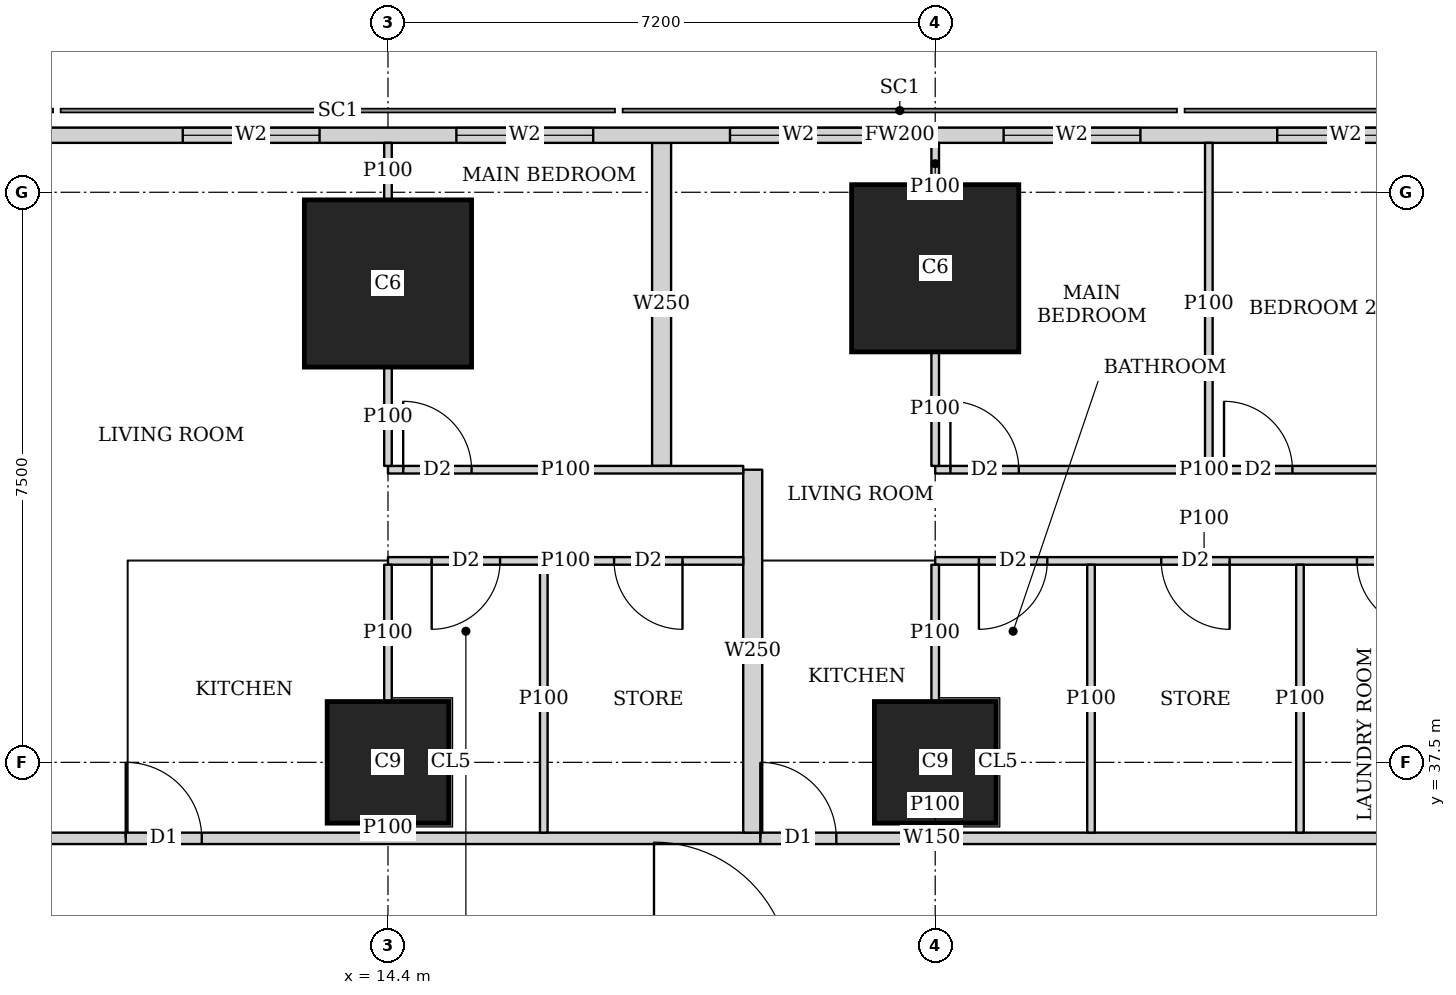
"""IFC4 building model, lengths in metres.
Left out: names, types, materials, properties, quantities, classifications, styles, units other than length and angle.
Written with IfcOpenShell. Run it as: python <this file> out.ifc"""

import sys

from ifc_helpers import new_model, si_unit, direction, frame, frame_2d, origin, origin_2d, place, context, subcontext, project, spatial, rectangle, extrude, element, fill, save


model = new_model("IFC4")
c1 = context("Model", 3, precision=1e-05, world=origin(), true_north=direction((0.0, 1.0)))
c2 = subcontext(c1, "Body", "Model", "MODEL_VIEW")
j1 = project(units=[si_unit("LENGTHUNIT", "METRE"), si_unit("PLANEANGLEUNIT", "RADIAN")], contexts=[c1])
p1 = place(None, origin())
s1 = spatial("IfcSite", under=j1, at=p1, CompositionType="ELEMENT")
p2 = place(p1, origin())
s2 = spatial("IfcBuilding", under=s1, at=p2, CompositionType="ELEMENT")
p3 = place(p2, frame((0.0, 0.0, 111.65)))
s3 = spatial("IfcBuildingStorey", under=s2, at=p3, CompositionType="ELEMENT", Elevation=111.65)
for number, where, z_axis, x_axis in (
    (1, (14.4, 37.5, 0.0), (0.0, 0.0, 1.0), (1.0, 0.0, 0.0)),
    (2, (21.6, 37.5, 0.0), (0.0, 0.0, 1.0), (1.0, 0.0, 0.0)),
):
    element("IfcColumn", number, at=place(p3, frame(where, z_axis=z_axis, x_axis=x_axis)), inside=s3, PredefinedType="COLUMN", context=c2, shape_type="SweptSolid", body=[
        extrude(rectangle(XDim=1.6, YDim=1.6, at=origin_2d()), origin(), (0.0, 0.0, 1.0), 3.75),
    ])
for number, where, z_axis, x_axis in (
    (3, (14.4, 43.8, 0.0), (0.0, 0.0, 1.0), (1.0, 0.0, 0.0)),
    (4, (21.6, 44.0, 0.0), (0.0, 0.0, 1.0), (1.0, 0.0, 0.0)),
):
    element("IfcColumn", number, at=place(p3, frame(where, z_axis=z_axis, x_axis=x_axis)), inside=s3, PredefinedType="COLUMN", context=c2, shape_type="SweptSolid", body=[
        extrude(rectangle(XDim=2.2, YDim=2.2, at=origin_2d()), origin(), (0.0, 0.0, 1.0), 3.75),
    ])
p4 = place(p3, frame((40.106, 45.75, 0.0), z_axis=(0.0, 0.0, 1.0), x_axis=(-1.0, 0.0, 0.0)))
e5 = element("IfcWall", 5, at=p4, inside=s3, PredefinedType="SOLIDWALL", context=c2, shape_type="SweptSolid", body=[
    extrude(rectangle(XDim=37.943, YDim=0.2, at=frame_2d((18.971, 0.0))), origin(), (0.0, 0.0, 1.0), 3.5),
])
p5 = place(p4, frame((8.606, 0.0, 0.9)))
e6 = element("IfcOpeningElement", 6, at=p5, cuts=e5, PredefinedType="OPENING", context=c2, shape_type="SweptSolid", body=[
    extrude(rectangle(XDim=1.8, YDim=1.5, at=frame_2d((0.9, 0.75))), frame((0.0, 0.11, 0.0), z_axis=(0.0, -1.0, 0.0), x_axis=(1.0, 0.0, 0.0)), (0.0, 0.0, 1.0), 0.22),
])
p6 = place(p4, frame((12.206, 0.0, 0.9)))
e7 = element("IfcOpeningElement", 7, at=p6, cuts=e5, PredefinedType="OPENING", context=c2, shape_type="SweptSolid", body=[
    extrude(rectangle(XDim=1.8, YDim=1.5, at=frame_2d((0.9, 0.75))), frame((0.0, 0.11, 0.0), z_axis=(0.0, -1.0, 0.0), x_axis=(1.0, 0.0, 0.0)), (0.0, 0.0, 1.0), 0.22),
])
p7 = place(p4, frame((15.806, 0.0, 0.9)))
e8 = element("IfcOpeningElement", 8, at=p7, cuts=e5, PredefinedType="OPENING", context=c2, shape_type="SweptSolid", body=[
    extrude(rectangle(XDim=1.8, YDim=1.5, at=frame_2d((0.9, 0.75))), frame((0.0, 0.11, 0.0), z_axis=(0.0, -1.0, 0.0), x_axis=(1.0, 0.0, 0.0)), (0.0, 0.0, 1.0), 0.22),
])
p8 = place(p4, frame((19.406, 0.0, 0.9)))
e9 = element("IfcOpeningElement", 9, at=p8, cuts=e5, PredefinedType="OPENING", context=c2, shape_type="SweptSolid", body=[
    extrude(rectangle(XDim=1.8, YDim=1.5, at=frame_2d((0.9, 0.75))), frame((0.0, 0.11, 0.0), z_axis=(0.0, -1.0, 0.0), x_axis=(1.0, 0.0, 0.0)), (0.0, 0.0, 1.0), 0.22),
])
p9 = place(p4, frame((23.006, 0.0, 0.9)))
e10 = element("IfcOpeningElement", 10, at=p9, cuts=e5, PredefinedType="OPENING", context=c2, shape_type="SweptSolid", body=[
    extrude(rectangle(XDim=1.8, YDim=1.5, at=frame_2d((0.9, 0.75))), frame((0.0, 0.11, 0.0), z_axis=(0.0, -1.0, 0.0), x_axis=(1.0, 0.0, 0.0)), (0.0, 0.0, 1.0), 0.22),
])
p10 = place(p4, frame((26.606, 0.0, 0.9)))
e11 = element("IfcOpeningElement", 11, at=p10, cuts=e5, PredefinedType="OPENING", context=c2, shape_type="SweptSolid", body=[
    extrude(rectangle(XDim=1.8, YDim=1.5, at=frame_2d((0.9, 0.75))), frame((0.0, 0.11, 0.0), z_axis=(0.0, -1.0, 0.0), x_axis=(1.0, 0.0, 0.0)), (0.0, 0.0, 1.0), 0.22),
])
p11 = place(p3, frame((8.35, 36.5, 0.0), z_axis=(0.0, 0.0, 1.0), x_axis=(1.0, 0.0, 0.0)))
e12 = element("IfcWall", 12, at=p11, inside=s3, PredefinedType="SOLIDWALL", context=c2, shape_type="SweptSolid", body=[
    extrude(rectangle(XDim=26.415, YDim=0.15, at=frame_2d((13.208, 0.0))), origin(), (0.0, 0.0, 1.0), 3.5),
])
p12 = place(p11, frame((2.6, 0.0, 0.0)))
e13 = element("IfcOpeningElement", 13, at=p12, cuts=e12, PredefinedType="OPENING", context=c2, shape_type="SweptSolid", body=[
    extrude(rectangle(XDim=1.0, YDim=2.1, at=frame_2d((0.5, 1.05))), frame((0.0, 0.085, 0.0), z_axis=(0.0, -1.0, 0.0), x_axis=(1.0, 0.0, 0.0)), (0.0, 0.0, 1.0), 0.17),
])
p13 = place(p11, frame((10.949, 0.0, 0.0)))
e14 = element("IfcOpeningElement", 14, at=p13, cuts=e12, PredefinedType="OPENING", context=c2, shape_type="SweptSolid", body=[
    extrude(rectangle(XDim=1.0, YDim=2.1, at=frame_2d((0.5, 1.05))), frame((0.0, 0.085, 0.0), z_axis=(0.0, -1.0, 0.0), x_axis=(1.0, 0.0, 0.0)), (0.0, 0.0, 1.0), 0.17),
])
p14 = place(p11, frame((23.923, 0.0, 0.0)))
e15 = element("IfcOpeningElement", 15, at=p14, cuts=e12, PredefinedType="OPENING", context=c2, shape_type="SweptSolid", body=[
    extrude(rectangle(XDim=1.0, YDim=2.1, at=frame_2d((0.5, 1.05))), frame((0.0, 0.085, 0.0), z_axis=(0.0, -1.0, 0.0), x_axis=(1.0, 0.0, 0.0)), (0.0, 0.0, 1.0), 0.17),
])
p15 = place(p3, frame((14.4, 41.35, 0.0), z_axis=(0.0, 0.0, 1.0), x_axis=(1.0, 0.0, 0.0)))
e16 = element("IfcWall", 16, at=p15, inside=s3, PredefinedType="PARTITIONING", context=c2, shape_type="SweptSolid", body=[
    extrude(rectangle(XDim=4.674, YDim=0.1, at=frame_2d((2.337, 0.0))), origin(), (0.0, 0.0, 1.0), 3.5),
])
p16 = place(p15, frame((0.2, 0.0, 0.0)))
e17 = element("IfcOpeningElement", 17, at=p16, cuts=e16, PredefinedType="OPENING", context=c2, shape_type="SweptSolid", body=[
    extrude(rectangle(XDim=0.9, YDim=2.1, at=frame_2d((0.45, 1.05))), frame((0.0, 0.06, 0.0), z_axis=(0.0, -1.0, 0.0), x_axis=(1.0, 0.0, 0.0)), (0.0, 0.0, 1.0), 0.12),
])
p17 = place(p3, frame((14.4, 40.15, 0.0), z_axis=(0.0, 0.0, 1.0), x_axis=(1.0, 0.0, 0.0)))
e18 = element("IfcWall", 18, at=p17, inside=s3, PredefinedType="PARTITIONING", context=c2, shape_type="SweptSolid", body=[
    extrude(rectangle(XDim=4.674, YDim=0.1, at=frame_2d((2.337, 0.0))), origin(), (0.0, 0.0, 1.0), 3.5),
])
p18 = place(p17, frame((0.575, 0.0, 0.0)))
e19 = element("IfcOpeningElement", 19, at=p18, cuts=e18, PredefinedType="OPENING", context=c2, shape_type="SweptSolid", body=[
    extrude(rectangle(XDim=0.9, YDim=2.1, at=frame_2d((0.45, 1.05))), frame((0.0, 0.06, 0.0), z_axis=(0.0, -1.0, 0.0), x_axis=(1.0, 0.0, 0.0)), (0.0, 0.0, 1.0), 0.12),
])
p19 = place(p17, frame((2.975, 0.0, 0.0)))
e20 = element("IfcOpeningElement", 20, at=p19, cuts=e18, PredefinedType="OPENING", context=c2, shape_type="SweptSolid", body=[
    extrude(rectangle(XDim=0.9, YDim=2.1, at=frame_2d((0.45, 1.05))), frame((0.0, 0.06, 0.0), z_axis=(0.0, -1.0, 0.0), x_axis=(1.0, 0.0, 0.0)), (0.0, 0.0, 1.0), 0.12),
])
p20 = place(p3, frame((14.4, 41.4, 0.0), z_axis=(0.0, 0.0, 1.0), x_axis=(0.0, 1.0, 0.0)))
e21 = element("IfcWall", 21, at=p20, inside=s3, PredefinedType="PARTITIONING", context=c2, shape_type="SweptSolid", body=[
    extrude(rectangle(XDim=1.299, YDim=0.1, at=frame_2d((0.649, 0.0))), origin(), (0.0, 0.0, 1.0), 3.5),
])
p21 = place(p3, frame((14.4, 44.901, 0.0), z_axis=(0.0, 0.0, 1.0), x_axis=(0.0, 1.0, 0.0)))
e22 = element("IfcWall", 22, at=p21, inside=s3, PredefinedType="PARTITIONING", context=c2, shape_type="SweptSolid", body=[
    extrude(rectangle(XDim=0.749, YDim=0.1, at=frame_2d((0.375, 0.0))), origin(), (0.0, 0.0, 1.0), 3.5),
])
p22 = place(p3, frame((14.4, 36.575, 0.0), z_axis=(0.0, 0.0, 1.0), x_axis=(0.0, 1.0, 0.0)))
e23 = element("IfcWall", 23, at=p22, inside=s3, PredefinedType="PARTITIONING", context=c2, shape_type="SweptSolid", body=[
    extrude(rectangle(XDim=0.124, YDim=0.1, at=frame_2d((0.062, 0.0))), origin(), (0.0, 0.0, 1.0), 3.5),
])
p23 = place(p3, frame((14.4, 38.301, 0.0), z_axis=(0.0, 0.0, 1.0), x_axis=(0.0, 1.0, 0.0)))
e24 = element("IfcWall", 24, at=p23, inside=s3, PredefinedType="PARTITIONING", context=c2, shape_type="SweptSolid", body=[
    extrude(rectangle(XDim=1.799, YDim=0.1, at=frame_2d((0.899, 0.0))), origin(), (0.0, 0.0, 1.0), 3.5),
])
p24 = place(p3, frame((16.45, 36.575, 0.0), z_axis=(0.0, 0.0, 1.0), x_axis=(0.0, 1.0, 0.0)))
e25 = element("IfcWall", 25, at=p24, inside=s3, PredefinedType="PARTITIONING", context=c2, shape_type="SweptSolid", body=[
    extrude(rectangle(XDim=3.525, YDim=0.1, at=frame_2d((1.763, 0.0))), origin(), (0.0, 0.0, 1.0), 3.5),
])
p25 = place(p3, frame((21.6, 41.35, 0.0), z_axis=(0.0, 0.0, 1.0), x_axis=(1.0, 0.0, 0.0)))
e26 = element("IfcWall", 26, at=p25, inside=s3, PredefinedType="PARTITIONING", context=c2, shape_type="SweptSolid", body=[
    extrude(rectangle(XDim=7.075, YDim=0.1, at=frame_2d((3.538, 0.0))), origin(), (0.0, 0.0, 1.0), 3.5),
])
p26 = place(p25, frame((0.2, 0.0, 0.0)))
e27 = element("IfcOpeningElement", 27, at=p26, cuts=e26, PredefinedType="OPENING", context=c2, shape_type="SweptSolid", body=[
    extrude(rectangle(XDim=0.9, YDim=2.1, at=frame_2d((0.45, 1.05))), frame((0.0, 0.06, 0.0), z_axis=(0.0, -1.0, 0.0), x_axis=(1.0, 0.0, 0.0)), (0.0, 0.0, 1.0), 0.12),
])
p27 = place(p25, frame((3.8, 0.0, 0.0)))
e28 = element("IfcOpeningElement", 28, at=p27, cuts=e26, PredefinedType="OPENING", context=c2, shape_type="SweptSolid", body=[
    extrude(rectangle(XDim=0.9, YDim=2.1, at=frame_2d((0.45, 1.05))), frame((0.0, 0.06, 0.0), z_axis=(0.0, -1.0, 0.0), x_axis=(1.0, 0.0, 0.0)), (0.0, 0.0, 1.0), 0.12),
])
p28 = place(p3, frame((21.6, 40.15, 0.0), z_axis=(0.0, 0.0, 1.0), x_axis=(1.0, 0.0, 0.0)))
e29 = element("IfcWall", 29, at=p28, inside=s3, PredefinedType="PARTITIONING", context=c2, shape_type="SweptSolid", body=[
    extrude(rectangle(XDim=7.075, YDim=0.1, at=frame_2d((3.538, 0.0))), origin(), (0.0, 0.0, 1.0), 3.5),
])
p29 = place(p28, frame((0.575, 0.0, 0.0)))
e30 = element("IfcOpeningElement", 30, at=p29, cuts=e29, PredefinedType="OPENING", context=c2, shape_type="SweptSolid", body=[
    extrude(rectangle(XDim=0.9, YDim=2.1, at=frame_2d((0.45, 1.05))), frame((0.0, 0.06, 0.0), z_axis=(0.0, -1.0, 0.0), x_axis=(1.0, 0.0, 0.0)), (0.0, 0.0, 1.0), 0.12),
])
p30 = place(p28, frame((5.549, 0.0, 0.0)))
e31 = element("IfcOpeningElement", 31, at=p30, cuts=e29, PredefinedType="OPENING", context=c2, shape_type="SweptSolid", body=[
    extrude(rectangle(XDim=0.9, YDim=2.1, at=frame_2d((0.45, 1.05))), frame((0.0, 0.06, 0.0), z_axis=(0.0, -1.0, 0.0), x_axis=(1.0, 0.0, 0.0)), (0.0, 0.0, 1.0), 0.12),
])
p31 = place(p28, frame((2.974, 0.0, 0.0)))
e32 = element("IfcOpeningElement", 32, at=p31, cuts=e29, PredefinedType="OPENING", context=c2, shape_type="SweptSolid", body=[
    extrude(rectangle(XDim=0.9, YDim=2.1, at=frame_2d((0.45, 1.05))), frame((0.0, 0.06, 0.0), z_axis=(0.0, -1.0, 0.0), x_axis=(1.0, 0.0, 0.0)), (0.0, 0.0, 1.0), 0.12),
])
p32 = place(p3, frame((21.6, 41.4, 0.0), z_axis=(0.0, 0.0, 1.0), x_axis=(0.0, 1.0, 0.0)))
e33 = element("IfcWall", 33, at=p32, inside=s3, PredefinedType="PARTITIONING", context=c2, shape_type="SweptSolid", body=[
    extrude(rectangle(XDim=1.499, YDim=0.1, at=frame_2d((0.75, 0.0))), origin(), (0.0, 0.0, 1.0), 3.5),
])
p33 = place(p3, frame((21.6, 45.101, 0.0), z_axis=(0.0, 0.0, 1.0), x_axis=(0.0, 1.0, 0.0)))
e34 = element("IfcWall", 34, at=p33, inside=s3, PredefinedType="PARTITIONING", context=c2, shape_type="SweptSolid", body=[
    extrude(rectangle(XDim=0.549, YDim=0.1, at=frame_2d((0.274, 0.0))), origin(), (0.0, 0.0, 1.0), 3.5),
])
p34 = place(p3, frame((25.2, 41.4, 0.0), z_axis=(0.0, 0.0, 1.0), x_axis=(0.0, 1.0, 0.0)))
e35 = element("IfcWall", 35, at=p34, inside=s3, PredefinedType="PARTITIONING", context=c2, shape_type="SweptSolid", body=[
    extrude(rectangle(XDim=4.25, YDim=0.1, at=frame_2d((2.125, 0.0))), origin(), (0.0, 0.0, 1.0), 2.2),
])
p35 = place(p3, frame((21.6, 36.575, 0.0), z_axis=(0.0, 0.0, 1.0), x_axis=(0.0, 1.0, 0.0)))
e36 = element("IfcWall", 36, at=p35, inside=s3, PredefinedType="PARTITIONING", context=c2, shape_type="SweptSolid", body=[
    extrude(rectangle(XDim=0.124, YDim=0.1, at=frame_2d((0.062, 0.0))), origin(), (0.0, 0.0, 1.0), 3.5),
])
p36 = place(p3, frame((21.6, 38.301, 0.0), z_axis=(0.0, 0.0, 1.0), x_axis=(0.0, 1.0, 0.0)))
e37 = element("IfcWall", 37, at=p36, inside=s3, PredefinedType="PARTITIONING", context=c2, shape_type="SweptSolid", body=[
    extrude(rectangle(XDim=1.799, YDim=0.1, at=frame_2d((0.899, 0.0))), origin(), (0.0, 0.0, 1.0), 3.5),
])
for number, where, z_axis, x_axis in (
    (38, (26.399, 36.575, 0.0), (0.0, 0.0, 1.0), (0.0, 1.0, 0.0)),
    (39, (23.65, 36.575, 0.0), (0.0, 0.0, 1.0), (0.0, 1.0, 0.0)),
):
    element("IfcWall", number, at=place(p3, frame(where, z_axis=z_axis, x_axis=x_axis)), inside=s3, PredefinedType="PARTITIONING", context=c2, shape_type="SweptSolid", body=[
        extrude(rectangle(XDim=3.525, YDim=0.1, at=frame_2d((1.763, 0.0))), origin(), (0.0, 0.0, 1.0), 3.5),
    ])
p37 = place(p3, frame((18.0, 41.4, 0.0), z_axis=(0.0, 0.0, 1.0), x_axis=(0.0, 1.0, 0.0)))
e40 = element("IfcWall", 40, at=p37, inside=s3, PredefinedType="SOLIDWALL", context=c2, shape_type="SweptSolid", body=[
    extrude(rectangle(XDim=4.25, YDim=0.25, at=frame_2d((2.125, 0.0))), origin(), (0.0, 0.0, 1.0), 2.2),
])
p38 = place(p3, frame((19.199, 36.575, 0.0), z_axis=(0.0, 0.0, 1.0), x_axis=(0.0, 1.0, 0.0)))
e41 = element("IfcWall", 41, at=p38, inside=s3, PredefinedType="SOLIDWALL", context=c2, shape_type="SweptSolid", body=[
    extrude(rectangle(XDim=4.775, YDim=0.25, at=frame_2d((2.388, 0.0))), origin(), (0.0, 0.0, 1.0), 3.5),
])
p39 = place(p6, origin())
e42 = element("IfcWindow", 42, at=p39, inside=s3, PartitioningType="SINGLE_PANEL", PredefinedType="WINDOW", context=c2, shape_type="SweptSolid", body=[
    extrude(rectangle(XDim=1.8, YDim=1.5, at=frame_2d((0.9, 0.75))), frame((0.0, 0.03, 0.0), z_axis=(0.0, -1.0, 0.0), x_axis=(1.0, 0.0, 0.0)), (0.0, 0.0, 1.0), 0.06),
])
fill(e7, e42)
p40 = place(p7, origin())
e43 = element("IfcWindow", 43, at=p40, inside=s3, PartitioningType="SINGLE_PANEL", PredefinedType="WINDOW", context=c2, shape_type="SweptSolid", body=[
    extrude(rectangle(XDim=1.8, YDim=1.5, at=frame_2d((0.9, 0.75))), frame((0.0, 0.03, 0.0), z_axis=(0.0, -1.0, 0.0), x_axis=(1.0, 0.0, 0.0)), (0.0, 0.0, 1.0), 0.06),
])
fill(e8, e43)
p41 = place(p8, origin())
e44 = element("IfcWindow", 44, at=p41, inside=s3, PartitioningType="SINGLE_PANEL", PredefinedType="WINDOW", context=c2, shape_type="SweptSolid", body=[
    extrude(rectangle(XDim=1.8, YDim=1.5, at=frame_2d((0.9, 0.75))), frame((0.0, 0.03, 0.0), z_axis=(0.0, -1.0, 0.0), x_axis=(1.0, 0.0, 0.0)), (0.0, 0.0, 1.0), 0.06),
])
fill(e9, e44)
p42 = place(p9, origin())
e45 = element("IfcWindow", 45, at=p42, inside=s3, PartitioningType="SINGLE_PANEL", PredefinedType="WINDOW", context=c2, shape_type="SweptSolid", body=[
    extrude(rectangle(XDim=1.8, YDim=1.5, at=frame_2d((0.9, 0.75))), frame((0.0, 0.03, 0.0), z_axis=(0.0, -1.0, 0.0), x_axis=(1.0, 0.0, 0.0)), (0.0, 0.0, 1.0), 0.06),
])
fill(e10, e45)
p43 = place(p10, origin())
e46 = element("IfcWindow", 46, at=p43, inside=s3, PartitioningType="SINGLE_PANEL", PredefinedType="WINDOW", context=c2, shape_type="SweptSolid", body=[
    extrude(rectangle(XDim=1.8, YDim=1.5, at=frame_2d((0.9, 0.75))), frame((0.0, 0.03, 0.0), z_axis=(0.0, -1.0, 0.0), x_axis=(1.0, 0.0, 0.0)), (0.0, 0.0, 1.0), 0.06),
])
fill(e11, e46)
p44 = place(p16, origin())
e47 = element("IfcDoor", 47, at=p44, inside=s3, OperationType="SINGLE_SWING_LEFT", PredefinedType="DOOR", context=c2, shape_type="SweptSolid", body=[
    extrude(rectangle(XDim=0.9, YDim=2.1, at=frame_2d((0.45, 1.05))), frame((0.0, 0.025, 0.0), z_axis=(0.0, -1.0, 0.0), x_axis=(1.0, 0.0, 0.0)), (0.0, 0.0, 1.0), 0.05),
])
fill(e17, e47)
p45 = place(p18, origin())
e48 = element("IfcDoor", 48, at=p45, inside=s3, OperationType="SINGLE_SWING_RIGHT", PredefinedType="DOOR", context=c2, shape_type="SweptSolid", body=[
    extrude(rectangle(XDim=0.9, YDim=2.1, at=frame_2d((0.45, 1.05))), frame((0.0, 0.025, 0.0), z_axis=(0.0, -1.0, 0.0), x_axis=(1.0, 0.0, 0.0)), (0.0, 0.0, 1.0), 0.05),
])
fill(e19, e48)
p46 = place(p19, origin())
e49 = element("IfcDoor", 49, at=p46, inside=s3, OperationType="SINGLE_SWING_LEFT", PredefinedType="DOOR", context=c2, shape_type="SweptSolid", body=[
    extrude(rectangle(XDim=0.9, YDim=2.1, at=frame_2d((0.45, 1.05))), frame((0.0, 0.025, 0.0), z_axis=(0.0, -1.0, 0.0), x_axis=(1.0, 0.0, 0.0)), (0.0, 0.0, 1.0), 0.05),
])
fill(e20, e49)
p47 = place(p12, origin())
e50 = element("IfcDoor", 50, at=p47, inside=s3, OperationType="SINGLE_SWING_LEFT", PredefinedType="DOOR", context=c2, shape_type="SweptSolid", body=[
    extrude(rectangle(XDim=1.0, YDim=2.1, at=frame_2d((0.5, 1.05))), frame((0.0, 0.025, 0.0), z_axis=(0.0, -1.0, 0.0), x_axis=(1.0, 0.0, 0.0)), (0.0, 0.0, 1.0), 0.05),
])
fill(e13, e50)
p48 = place(p26, origin())
e51 = element("IfcDoor", 51, at=p48, inside=s3, OperationType="SINGLE_SWING_LEFT", PredefinedType="DOOR", context=c2, shape_type="SweptSolid", body=[
    extrude(rectangle(XDim=0.9, YDim=2.1, at=frame_2d((0.45, 1.05))), frame((0.0, 0.025, 0.0), z_axis=(0.0, -1.0, 0.0), x_axis=(1.0, 0.0, 0.0)), (0.0, 0.0, 1.0), 0.05),
])
fill(e27, e51)
p49 = place(p27, origin())
e52 = element("IfcDoor", 52, at=p49, inside=s3, OperationType="SINGLE_SWING_LEFT", PredefinedType="DOOR", context=c2, shape_type="SweptSolid", body=[
    extrude(rectangle(XDim=0.9, YDim=2.1, at=frame_2d((0.45, 1.05))), frame((0.0, 0.025, 0.0), z_axis=(0.0, -1.0, 0.0), x_axis=(1.0, 0.0, 0.0)), (0.0, 0.0, 1.0), 0.05),
])
fill(e28, e52)
p50 = place(p29, origin())
e53 = element("IfcDoor", 53, at=p50, inside=s3, OperationType="SINGLE_SWING_RIGHT", PredefinedType="DOOR", context=c2, shape_type="SweptSolid", body=[
    extrude(rectangle(XDim=0.9, YDim=2.1, at=frame_2d((0.45, 1.05))), frame((0.0, 0.025, 0.0), z_axis=(0.0, -1.0, 0.0), x_axis=(1.0, 0.0, 0.0)), (0.0, 0.0, 1.0), 0.05),
])
fill(e30, e53)
p51 = place(p30, origin())
e54 = element("IfcDoor", 54, at=p51, inside=s3, OperationType="SINGLE_SWING_LEFT", PredefinedType="DOOR", context=c2, shape_type="SweptSolid", body=[
    extrude(rectangle(XDim=0.9, YDim=2.1, at=frame_2d((0.45, 1.05))), frame((0.0, 0.025, 0.0), z_axis=(0.0, -1.0, 0.0), x_axis=(1.0, 0.0, 0.0)), (0.0, 0.0, 1.0), 0.05),
])
fill(e31, e54)
p52 = place(p31, origin())
e55 = element("IfcDoor", 55, at=p52, inside=s3, OperationType="SINGLE_SWING_LEFT", PredefinedType="DOOR", context=c2, shape_type="SweptSolid", body=[
    extrude(rectangle(XDim=0.9, YDim=2.1, at=frame_2d((0.45, 1.05))), frame((0.0, 0.025, 0.0), z_axis=(0.0, -1.0, 0.0), x_axis=(1.0, 0.0, 0.0)), (0.0, 0.0, 1.0), 0.05),
])
fill(e32, e55)
p53 = place(p13, origin())
e56 = element("IfcDoor", 56, at=p53, inside=s3, OperationType="SINGLE_SWING_LEFT", PredefinedType="DOOR", context=c2, shape_type="SweptSolid", body=[
    extrude(rectangle(XDim=1.0, YDim=2.1, at=frame_2d((0.5, 1.05))), frame((0.0, 0.025, 0.0), z_axis=(0.0, -1.0, 0.0), x_axis=(1.0, 0.0, 0.0)), (0.0, 0.0, 1.0), 0.05),
])
fill(e14, e56)
save(model, sys.argv[1])
